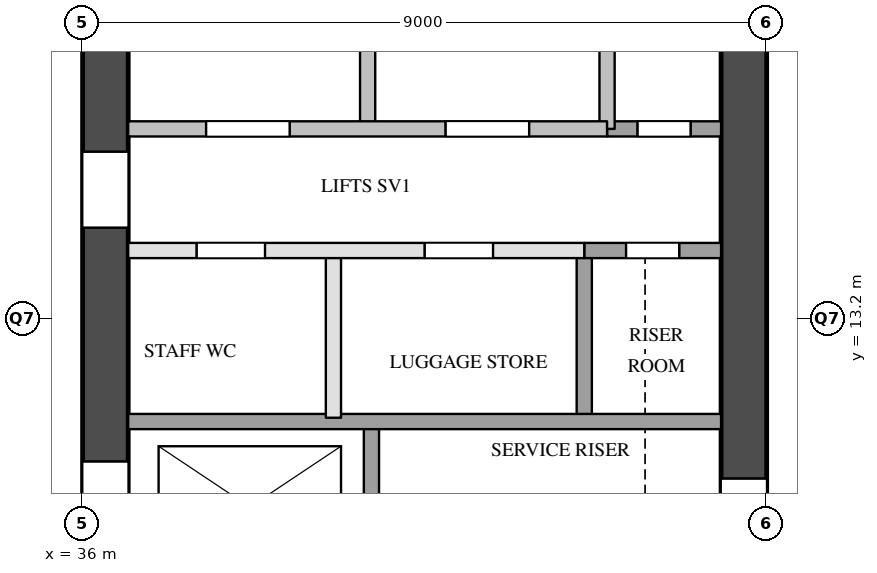
"""IFC4 building model, lengths in metres.
Left out: names, types, materials, properties, quantities, classifications, styles, units other than length and angle.
Written with IfcOpenShell. Run it as: python <this file> out.ifc"""

import sys

from ifc_helpers import new_model, si_unit, direction, frame, frame_2d, origin, place, context, subcontext, project, spatial, rectangle, extrude, element, fill, save


model = new_model("IFC4")
c1 = context("Model", 3, precision=1e-05, world=origin(), true_north=direction((0.0, 1.0)))
c2 = subcontext(c1, "Body", "Model", "MODEL_VIEW")
j1 = project(units=[si_unit("LENGTHUNIT", "METRE"), si_unit("PLANEANGLEUNIT", "RADIAN")], contexts=[c1])
p1 = place(None, origin())
s1 = spatial("IfcSite", under=j1, at=p1, CompositionType="ELEMENT")
p2 = place(p1, origin())
s2 = spatial("IfcBuilding", under=s1, at=p2, CompositionType="ELEMENT")
p3 = place(p2, frame((0.0, 0.0, 38.6)))
s3 = spatial("IfcBuildingStorey", under=s2, at=p3, CompositionType="ELEMENT", Elevation=38.6)
p4 = place(p3, frame((36.3, 9.6, 0.0), z_axis=(0.0, 0.0, 1.0), x_axis=(0.0, 1.0, 0.0)))
e1 = element("IfcWall", 1, at=p4, inside=s3, PredefinedType="SHEAR", context=c2, shape_type="SweptSolid", body=[
    extrude(rectangle(XDim=12.3, YDim=0.6, at=frame_2d((6.15, 0.0))), origin(), (0.0, 0.0, 1.0), 3.5),
])
p5 = place(p4, frame((0.525, 0.0, 0.0)))
e2 = element("IfcOpeningElement", 2, at=p5, cuts=e1, PredefinedType="OPENING", context=c2, shape_type="SweptSolid", body=[
    extrude(rectangle(XDim=1.2, YDim=2.1, at=frame_2d((0.6, 1.05))), frame((0.0, 0.31, 0.0), z_axis=(0.0, -1.0, 0.0), x_axis=(1.0, 0.0, 0.0)), (0.0, 0.0, 1.0), 0.62),
])
p6 = place(p4, frame((4.8, 0.0, 0.0)))
e3 = element("IfcOpeningElement", 3, at=p6, cuts=e1, PredefinedType="OPENING", context=c2, shape_type="SweptSolid", body=[
    extrude(rectangle(XDim=1.0, YDim=2.1, at=frame_2d((0.5, 1.05))), frame((0.0, 0.31, 0.0), z_axis=(0.0, -1.0, 0.0), x_axis=(1.0, 0.0, 0.0)), (0.0, 0.0, 1.0), 0.62),
])
p7 = place(p3, frame((44.7, 9.6, 0.0), z_axis=(0.0, 0.0, 1.0), x_axis=(0.0, 1.0, 0.0)))
e4 = element("IfcWall", 4, at=p7, inside=s3, PredefinedType="SHEAR", context=c2, shape_type="SweptSolid", body=[
    extrude(rectangle(XDim=12.3, YDim=0.6, at=frame_2d((6.15, 0.0))), origin(), (0.0, 0.0, 1.0), 3.5),
])
p8 = place(p7, frame((0.8, 0.0, 0.0)))
e5 = element("IfcOpeningElement", 5, at=p8, cuts=e4, PredefinedType="OPENING", context=c2, shape_type="SweptSolid", body=[
    extrude(rectangle(XDim=0.7, YDim=2.1, at=frame_2d((0.35, 1.05))), frame((0.0, 0.31, 0.0), z_axis=(0.0, -1.0, 0.0), x_axis=(1.0, 0.0, 0.0)), (0.0, 0.0, 1.0), 0.62),
])
p9 = place(p3, frame((39.3, 11.9, 0.0), z_axis=(0.0, 0.0, 1.0), x_axis=(0.0, 1.0, 0.0)))
e6 = element("IfcWall", 6, at=p9, inside=s3, PredefinedType="PARTITIONING", context=c2, shape_type="SweptSolid", body=[
    extrude(rectangle(XDim=2.2, YDim=0.2, at=frame_2d((1.1, 0.0))), origin(), (0.0, 0.0, 1.0), 3.5),
])
p10 = place(p3, frame((39.75, 15.7, 0.0), z_axis=(0.0, 0.0, 1.0), x_axis=(0.0, 1.0, 0.0)))
e7 = element("IfcWall", 7, at=p10, inside=s3, PredefinedType="SOLIDWALL", context=c2, shape_type="SweptSolid", body=[
    extrude(rectangle(XDim=4.3, YDim=0.2, at=frame_2d((2.15, 0.0))), origin(), (0.0, 0.0, 1.0), 3.5),
])
p11 = place(p3, frame((39.8, 9.6, 0.0), z_axis=(0.0, 0.0, 1.0), x_axis=(0.0, 1.0, 0.0)))
e8 = element("IfcWall", 8, at=p11, inside=s3, PredefinedType="SOLIDWALL", context=c2, shape_type="SweptSolid", body=[
    extrude(rectangle(XDim=2.3, YDim=0.2, at=frame_2d((1.15, 0.0))), origin(), (0.0, 0.0, 1.0), 3.5),
])
p12 = place(p3, frame((42.6, 11.9, 0.0), z_axis=(0.0, 0.0, 1.0), x_axis=(0.0, 1.0, 0.0)))
e9 = element("IfcWall", 9, at=p12, inside=s3, PredefinedType="SOLIDWALL", context=c2, shape_type="SweptSolid", body=[
    extrude(rectangle(XDim=2.2, YDim=0.2, at=frame_2d((1.1, 0.0))), origin(), (0.0, 0.0, 1.0), 3.5),
])
p13 = place(p3, frame((42.9, 15.7, 0.0), z_axis=(0.0, 0.0, 1.0), x_axis=(0.0, 1.0, 0.0)))
e10 = element("IfcWall", 10, at=p13, inside=s3, PredefinedType="SOLIDWALL", context=c2, shape_type="SweptSolid", body=[
    extrude(rectangle(XDim=4.3, YDim=0.2, at=frame_2d((2.15, 0.0))), origin(), (0.0, 0.0, 1.0), 3.5),
])
p14 = place(p3, frame((36.6, 11.85, 0.0), z_axis=(0.0, 0.0, 1.0), x_axis=(1.0, 0.0, 0.0)))
e11 = element("IfcWall", 11, at=p14, inside=s3, PredefinedType="SOLIDWALL", context=c2, shape_type="SweptSolid", body=[
    extrude(rectangle(XDim=7.8, YDim=0.2, at=frame_2d((3.9, 0.0))), origin(), (0.0, 0.0, 1.0), 3.5),
])
p15 = place(p3, frame((36.6, 14.1, 0.0), z_axis=(0.0, 0.0, 1.0), x_axis=(1.0, 0.0, 0.0)))
e12 = element("IfcWall", 12, at=p15, inside=s3, PredefinedType="PARTITIONING", context=c2, shape_type="SweptSolid", body=[
    extrude(rectangle(XDim=6.0, YDim=0.2, at=frame_2d((3.0, 0.0))), origin(), (0.0, 0.0, 1.0), 3.5),
])
p16 = place(p15, frame((0.9, 0.0, 0.0)))
e13 = element("IfcOpeningElement", 13, at=p16, cuts=e12, PredefinedType="OPENING", context=c2, shape_type="SweptSolid", body=[
    extrude(rectangle(XDim=0.9, YDim=2.1, at=frame_2d((0.45, 1.05))), frame((0.0, 0.11, 0.0), z_axis=(0.0, -1.0, 0.0), x_axis=(1.0, 0.0, 0.0)), (0.0, 0.0, 1.0), 0.22),
])
p17 = place(p15, frame((3.9, 0.0, 0.0)))
e14 = element("IfcOpeningElement", 14, at=p17, cuts=e12, PredefinedType="OPENING", context=c2, shape_type="SweptSolid", body=[
    extrude(rectangle(XDim=0.9, YDim=2.1, at=frame_2d((0.45, 1.05))), frame((0.0, 0.11, 0.0), z_axis=(0.0, -1.0, 0.0), x_axis=(1.0, 0.0, 0.0)), (0.0, 0.0, 1.0), 0.22),
])
p18 = place(p3, frame((42.6, 14.1, 0.0), z_axis=(0.0, 0.0, 1.0), x_axis=(1.0, 0.0, 0.0)))
e15 = element("IfcWall", 15, at=p18, inside=s3, PredefinedType="SOLIDWALL", context=c2, shape_type="SweptSolid", body=[
    extrude(rectangle(XDim=1.8, YDim=0.2, at=frame_2d((0.9, 0.0))), origin(), (0.0, 0.0, 1.0), 3.5),
])
p19 = place(p18, frame((0.55, 0.0, 0.0)))
e16 = element("IfcOpeningElement", 16, at=p19, cuts=e15, PredefinedType="OPENING", context=c2, shape_type="SweptSolid", body=[
    extrude(rectangle(XDim=0.7, YDim=2.1, at=frame_2d((0.35, 1.05))), frame((0.0, 0.11, 0.0), z_axis=(0.0, -1.0, 0.0), x_axis=(1.0, 0.0, 0.0)), (0.0, 0.0, 1.0), 0.22),
])
p20 = place(p3, frame((42.9, 15.7, 0.0), z_axis=(0.0, 0.0, 1.0), x_axis=(1.0, 0.0, 0.0)))
e17 = element("IfcWall", 17, at=p20, inside=s3, PredefinedType="SOLIDWALL", context=c2, shape_type="SweptSolid", body=[
    extrude(rectangle(XDim=1.5, YDim=0.2, at=frame_2d((0.75, 0.0))), origin(), (0.0, 0.0, 1.0), 3.5),
])
p21 = place(p20, frame((0.4, 0.0, 0.0)))
e18 = element("IfcOpeningElement", 18, at=p21, cuts=e17, PredefinedType="OPENING", context=c2, shape_type="SweptSolid", body=[
    extrude(rectangle(XDim=0.7, YDim=2.1, at=frame_2d((0.35, 1.05))), frame((0.0, 0.11, 0.0), z_axis=(0.0, -1.0, 0.0), x_axis=(1.0, 0.0, 0.0)), (0.0, 0.0, 1.0), 0.22),
])
p22 = place(p3, frame((36.6, 15.7, 0.0), z_axis=(0.0, 0.0, 1.0), x_axis=(1.0, 0.0, 0.0)))
e19 = element("IfcWall", 19, at=p22, inside=s3, PredefinedType="SOLIDWALL", context=c2, shape_type="SweptSolid", body=[
    extrude(rectangle(XDim=6.3, YDim=0.2, at=frame_2d((3.15, 0.0))), origin(), (0.0, 0.0, 1.0), 3.5),
])
p23 = place(p22, frame((1.025, 0.0, 0.0)))
e20 = element("IfcOpeningElement", 20, at=p23, cuts=e19, PredefinedType="OPENING", context=c2, shape_type="SweptSolid", body=[
    extrude(rectangle(XDim=1.1, YDim=2.1, at=frame_2d((0.55, 1.05))), frame((0.0, 0.11, 0.0), z_axis=(0.0, -1.0, 0.0), x_axis=(1.0, 0.0, 0.0)), (0.0, 0.0, 1.0), 0.22),
])
p24 = place(p22, frame((4.175, 0.0, 0.0)))
e21 = element("IfcOpeningElement", 21, at=p24, cuts=e19, PredefinedType="OPENING", context=c2, shape_type="SweptSolid", body=[
    extrude(rectangle(XDim=1.1, YDim=2.1, at=frame_2d((0.55, 1.05))), frame((0.0, 0.11, 0.0), z_axis=(0.0, -1.0, 0.0), x_axis=(1.0, 0.0, 0.0)), (0.0, 0.0, 1.0), 0.22),
])
p25 = place(p5, origin())
e22 = element("IfcDoor", 22, at=p25, inside=s3, OperationType="SLIDING_TO_LEFT", PredefinedType="DOOR", context=c2, shape_type="SweptSolid", body=[
    extrude(rectangle(XDim=1.2, YDim=2.1, at=frame_2d((0.6, 1.05))), frame((0.0, 0.025, 0.0), z_axis=(0.0, -1.0, 0.0), x_axis=(1.0, 0.0, 0.0)), (0.0, 0.0, 1.0), 0.05),
])
fill(e2, e22)
p26 = place(p23, origin())
e23 = element("IfcDoor", 23, at=p26, inside=s3, OperationType="SINGLE_SWING_LEFT", PredefinedType="DOOR", context=c2, shape_type="SweptSolid", body=[
    extrude(rectangle(XDim=1.1, YDim=2.1, at=frame_2d((0.55, 1.05))), frame((0.0, 0.025, 0.0), z_axis=(0.0, -1.0, 0.0), x_axis=(1.0, 0.0, 0.0)), (0.0, 0.0, 1.0), 0.05),
])
fill(e20, e23)
p27 = place(p24, origin())
e24 = element("IfcDoor", 24, at=p27, inside=s3, OperationType="SINGLE_SWING_RIGHT", PredefinedType="DOOR", context=c2, shape_type="SweptSolid", body=[
    extrude(rectangle(XDim=1.1, YDim=2.1, at=frame_2d((0.55, 1.05))), frame((0.0, 0.025, 0.0), z_axis=(0.0, -1.0, 0.0), x_axis=(1.0, 0.0, 0.0)), (0.0, 0.0, 1.0), 0.05),
])
fill(e21, e24)
p28 = place(p21, origin())
e25 = element("IfcDoor", 25, at=p28, inside=s3, OperationType="SINGLE_SWING_LEFT", PredefinedType="DOOR", context=c2, shape_type="SweptSolid", body=[
    extrude(rectangle(XDim=0.7, YDim=2.1, at=frame_2d((0.35, 1.05))), frame((0.0, 0.025, 0.0), z_axis=(0.0, -1.0, 0.0), x_axis=(1.0, 0.0, 0.0)), (0.0, 0.0, 1.0), 0.05),
])
fill(e18, e25)
p29 = place(p19, origin())
e26 = element("IfcDoor", 26, at=p29, inside=s3, OperationType="SINGLE_SWING_RIGHT", PredefinedType="DOOR", context=c2, shape_type="SweptSolid", body=[
    extrude(rectangle(XDim=0.7, YDim=2.1, at=frame_2d((0.35, 1.05))), frame((0.0, 0.025, 0.0), z_axis=(0.0, -1.0, 0.0), x_axis=(1.0, 0.0, 0.0)), (0.0, 0.0, 1.0), 0.05),
])
fill(e16, e26)
p30 = place(p8, origin())
e27 = element("IfcDoor", 27, at=p30, inside=s3, OperationType="SINGLE_SWING_LEFT", PredefinedType="DOOR", context=c2, shape_type="SweptSolid", body=[
    extrude(rectangle(XDim=0.7, YDim=2.1, at=frame_2d((0.35, 1.05))), frame((0.0, 0.025, 0.0), z_axis=(0.0, -1.0, 0.0), x_axis=(1.0, 0.0, 0.0)), (0.0, 0.0, 1.0), 0.05),
])
fill(e5, e27)
p31 = place(p6, origin())
e28 = element("IfcDoor", 28, at=p31, inside=s3, OperationType="SINGLE_SWING_LEFT", PredefinedType="DOOR", context=c2, shape_type="SweptSolid", body=[
    extrude(rectangle(XDim=1.0, YDim=2.1, at=frame_2d((0.5, 1.05))), frame((0.0, 0.025, 0.0), z_axis=(0.0, -1.0, 0.0), x_axis=(1.0, 0.0, 0.0)), (0.0, 0.0, 1.0), 0.05),
])
fill(e3, e28)
p32 = place(p16, origin())
e29 = element("IfcDoor", 29, at=p32, inside=s3, OperationType="SINGLE_SWING_LEFT", PredefinedType="DOOR", context=c2, shape_type="SweptSolid", body=[
    extrude(rectangle(XDim=0.9, YDim=2.1, at=frame_2d((0.45, 1.05))), frame((0.0, 0.025, 0.0), z_axis=(0.0, -1.0, 0.0), x_axis=(1.0, 0.0, 0.0)), (0.0, 0.0, 1.0), 0.05),
])
fill(e13, e29)
p33 = place(p17, origin())
e30 = element("IfcDoor", 30, at=p33, inside=s3, OperationType="SINGLE_SWING_RIGHT", PredefinedType="DOOR", context=c2, shape_type="SweptSolid", body=[
    extrude(rectangle(XDim=0.9, YDim=2.1, at=frame_2d((0.45, 1.05))), frame((0.0, 0.025, 0.0), z_axis=(0.0, -1.0, 0.0), x_axis=(1.0, 0.0, 0.0)), (0.0, 0.0, 1.0), 0.05),
])
fill(e14, e30)
save(model, sys.argv[1])
